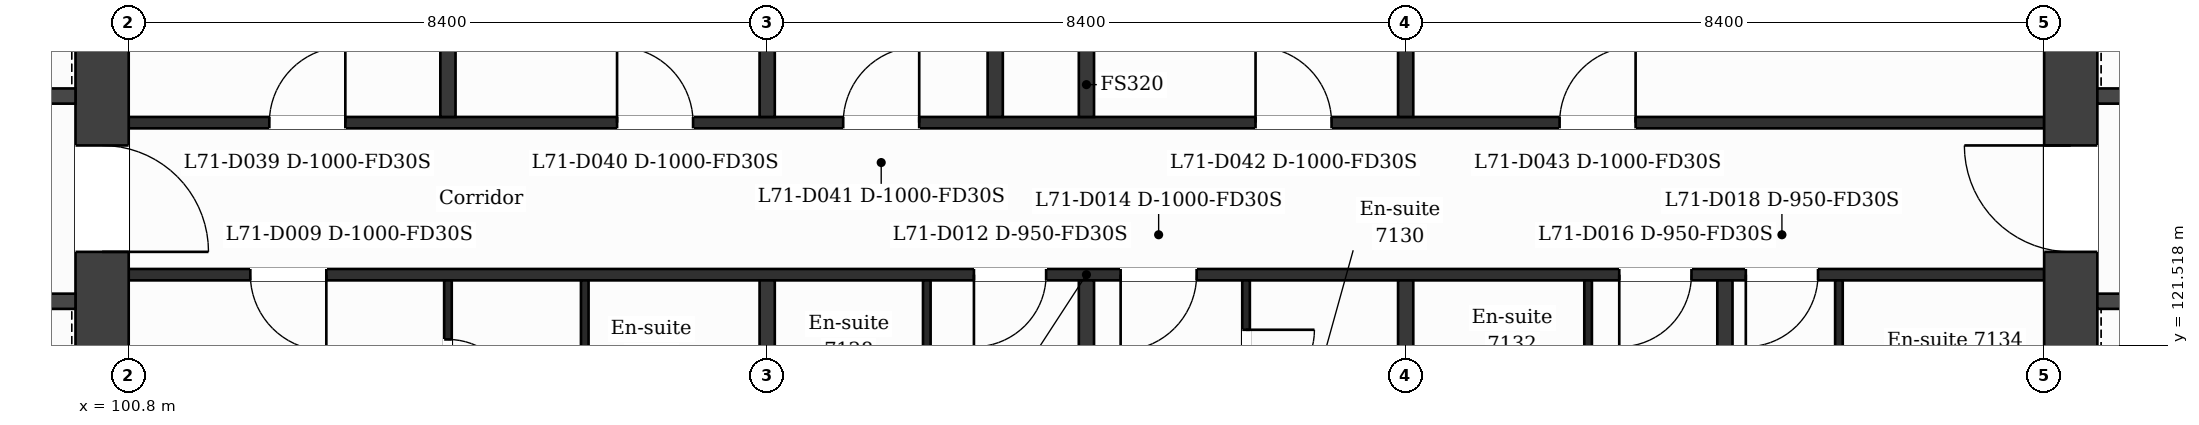
"""IFC4 building model, lengths in metres.
Left out: names, types, materials, properties, quantities, classifications, styles, units other than length and angle.
Written with IfcOpenShell. Run it as: python <this file> out.ifc"""

import sys

from ifc_helpers import new_model, si_unit, direction, frame, frame_2d, origin, place, context, subcontext, project, spatial, rectangle, extrude, element, fill, save


model = new_model("IFC4")
c1 = context("Model", 3, precision=1e-05, world=origin(), true_north=direction((0.0, 1.0)))
c2 = subcontext(c1, "Body", "Model", "MODEL_VIEW")
j1 = project(units=[si_unit("LENGTHUNIT", "METRE"), si_unit("PLANEANGLEUNIT", "RADIAN")], contexts=[c1])
p1 = place(None, origin())
s1 = spatial("IfcSite", under=j1, at=p1, CompositionType="ELEMENT")
p2 = place(p1, origin())
s2 = spatial("IfcBuilding", under=s1, at=p2, CompositionType="ELEMENT")
p3 = place(p2, frame((0.0, 0.0, 292.3)))
s3 = spatial("IfcBuildingStorey", under=s2, at=p3, CompositionType="ELEMENT", Elevation=292.3)
p4 = place(p3, frame((100.45, 132.05, 0.0), z_axis=(0.0, 0.0, 1.0), x_axis=(0.0, -1.0, 0.0)))
e1 = element("IfcWall", 1, at=p4, inside=s3, PredefinedType="SHEAR", context=c2, shape_type="SweptSolid", body=[
    extrude(rectangle(XDim=15.7, YDim=0.7, at=frame_2d((7.85, 0.0))), origin(), (0.0, 0.0, 1.0), 3.7),
])
p5 = place(p4, frame((7.9, 0.0, 0.0)))
e2 = element("IfcOpeningElement", 2, at=p5, cuts=e1, PredefinedType="OPENING", context=c2, shape_type="SweptSolid", body=[
    extrude(rectangle(XDim=1.4, YDim=2.1, at=frame_2d((0.7, 1.05))), frame((0.0, 0.36, 0.0), z_axis=(0.0, -1.0, 0.0), x_axis=(1.0, 0.0, 0.0)), (0.0, 0.0, 1.0), 0.72),
])
p6 = place(p3, frame((126.35, 116.35, 0.0), z_axis=(0.0, 0.0, 1.0), x_axis=(0.0, 1.0, 0.0)))
e3 = element("IfcWall", 3, at=p6, inside=s3, PredefinedType="SHEAR", context=c2, shape_type="SweptSolid", body=[
    extrude(rectangle(XDim=15.7, YDim=0.7, at=frame_2d((7.85, 0.0))), origin(), (0.0, 0.0, 1.0), 3.7),
])
p7 = place(p6, frame((6.4, 0.0, 0.0)))
e4 = element("IfcOpeningElement", 4, at=p7, cuts=e3, PredefinedType="OPENING", context=c2, shape_type="SweptSolid", body=[
    extrude(rectangle(XDim=1.4, YDim=2.1, at=frame_2d((0.7, 1.05))), frame((0.0, 0.36, 0.0), z_axis=(0.0, -1.0, 0.0), x_axis=(1.0, 0.0, 0.0)), (0.0, 0.0, 1.0), 0.72),
])
p8 = place(p3, frame((95.227, 122.1, 0.0), z_axis=(0.0, 0.0, 1.0), x_axis=(1.0, 0.0, 0.0)))
e5 = element("IfcWall", 5, at=p8, inside=s3, PredefinedType="PARTITIONING", context=c2, shape_type="SweptSolid", body=[
    extrude(rectangle(XDim=4.873, YDim=0.2, at=frame_2d((2.437, 0.0))), origin(), (0.0, 0.0, 1.0), 3.38),
])
p9 = place(p8, frame((0.732, 0.0, 0.0)))
e6 = element("IfcOpeningElement", 6, at=p9, cuts=e5, PredefinedType="OPENING", context=c2, shape_type="SweptSolid", body=[
    extrude(rectangle(XDim=1.1, YDim=2.1, at=frame_2d((0.55, 1.05))), frame((0.0, 0.11, 0.0), z_axis=(0.0, -1.0, 0.0), x_axis=(1.0, 0.0, 0.0)), (0.0, 0.0, 1.0), 0.22),
])
p10 = place(p8, frame((3.264, 0.0, 0.0)))
e7 = element("IfcOpeningElement", 7, at=p10, cuts=e5, PredefinedType="OPENING", context=c2, shape_type="SweptSolid", body=[
    extrude(rectangle(XDim=1.1, YDim=2.1, at=frame_2d((0.55, 1.05))), frame((0.0, 0.11, 0.0), z_axis=(0.0, -1.0, 0.0), x_axis=(1.0, 0.0, 0.0)), (0.0, 0.0, 1.0), 0.22),
])
p11 = place(p3, frame((126.7, 122.1, 0.0), z_axis=(0.0, 0.0, 1.0), x_axis=(1.0, 0.0, 0.0)))
e8 = element("IfcWall", 8, at=p11, inside=s3, PredefinedType="PARTITIONING", context=c2, shape_type="SweptSolid", body=[
    extrude(rectangle(XDim=4.873, YDim=0.2, at=frame_2d((2.437, 0.0))), origin(), (0.0, 0.0, 1.0), 3.38),
])
p12 = place(p11, frame((3.264, 0.0, 0.0)))
e9 = element("IfcOpeningElement", 9, at=p12, cuts=e8, PredefinedType="OPENING", context=c2, shape_type="SweptSolid", body=[
    extrude(rectangle(XDim=1.1, YDim=2.1, at=frame_2d((0.55, 1.05))), frame((0.0, 0.11, 0.0), z_axis=(0.0, -1.0, 0.0), x_axis=(1.0, 0.0, 0.0)), (0.0, 0.0, 1.0), 0.22),
])
p13 = place(p11, frame((0.827, 0.0, 0.0)))
e10 = element("IfcOpeningElement", 10, at=p13, cuts=e8, PredefinedType="OPENING", context=c2, shape_type="SweptSolid", body=[
    extrude(rectangle(XDim=1.1, YDim=2.1, at=frame_2d((0.55, 1.05))), frame((0.0, 0.11, 0.0), z_axis=(0.0, -1.0, 0.0), x_axis=(1.0, 0.0, 0.0)), (0.0, 0.0, 1.0), 0.22),
])
p14 = place(p3, frame((100.8, 122.45, 0.0), z_axis=(0.0, 0.0, 1.0), x_axis=(1.0, 0.0, 0.0)))
e11 = element("IfcWall", 11, at=p14, inside=s3, PredefinedType="PARTITIONING", context=c2, shape_type="SweptSolid", body=[
    extrude(rectangle(XDim=25.2, YDim=0.15, at=frame_2d((12.6, 0.0))), origin(), (0.0, 0.0, 1.0), 3.38),
])
p15 = place(p14, frame((1.6, 0.0, 0.0)))
e12 = element("IfcOpeningElement", 12, at=p15, cuts=e11, PredefinedType="OPENING", context=c2, shape_type="SweptSolid", body=[
    extrude(rectangle(XDim=1.0, YDim=2.1, at=frame_2d((0.5, 1.05))), frame((0.0, 0.085, 0.0), z_axis=(0.0, -1.0, 0.0), x_axis=(1.0, 0.0, 0.0)), (0.0, 0.0, 1.0), 0.17),
])
p16 = place(p14, frame((11.12, 0.0, 0.0)))
e13 = element("IfcOpeningElement", 13, at=p16, cuts=e11, PredefinedType="OPENING", context=c2, shape_type="SweptSolid", body=[
    extrude(rectangle(XDim=0.95, YDim=2.1, at=frame_2d((0.475, 1.05))), frame((0.0, 0.085, 0.0), z_axis=(0.0, -1.0, 0.0), x_axis=(1.0, 0.0, 0.0)), (0.0, 0.0, 1.0), 0.17),
])
p17 = place(p14, frame((13.05, 0.0, 0.0)))
e14 = element("IfcOpeningElement", 14, at=p17, cuts=e11, PredefinedType="OPENING", context=c2, shape_type="SweptSolid", body=[
    extrude(rectangle(XDim=1.0, YDim=2.1, at=frame_2d((0.5, 1.05))), frame((0.0, 0.085, 0.0), z_axis=(0.0, -1.0, 0.0), x_axis=(1.0, 0.0, 0.0)), (0.0, 0.0, 1.0), 0.17),
])
p18 = place(p14, frame((19.61, 0.0, 0.0)))
e15 = element("IfcOpeningElement", 15, at=p18, cuts=e11, PredefinedType="OPENING", context=c2, shape_type="SweptSolid", body=[
    extrude(rectangle(XDim=0.95, YDim=2.1, at=frame_2d((0.475, 1.05))), frame((0.0, 0.085, 0.0), z_axis=(0.0, -1.0, 0.0), x_axis=(1.0, 0.0, 0.0)), (0.0, 0.0, 1.0), 0.17),
])
p19 = place(p14, frame((21.275, 0.0, 0.0)))
e16 = element("IfcOpeningElement", 16, at=p19, cuts=e11, PredefinedType="OPENING", context=c2, shape_type="SweptSolid", body=[
    extrude(rectangle(XDim=0.95, YDim=2.1, at=frame_2d((0.475, 1.05))), frame((0.0, 0.085, 0.0), z_axis=(0.0, -1.0, 0.0), x_axis=(1.0, 0.0, 0.0)), (0.0, 0.0, 1.0), 0.17),
])
p20 = place(p3, frame((100.8, 124.45, 0.0), z_axis=(0.0, 0.0, 1.0), x_axis=(1.0, 0.0, 0.0)))
e17 = element("IfcWall", 17, at=p20, inside=s3, PredefinedType="PARTITIONING", context=c2, shape_type="SweptSolid", body=[
    extrude(rectangle(XDim=25.2, YDim=0.15, at=frame_2d((12.6, 0.0))), origin(), (0.0, 0.0, 1.0), 3.38),
])
p21 = place(p20, frame((1.85, 0.0, 0.0)))
e18 = element("IfcOpeningElement", 18, at=p21, cuts=e17, PredefinedType="OPENING", context=c2, shape_type="SweptSolid", body=[
    extrude(rectangle(XDim=1.0, YDim=2.1, at=frame_2d((0.5, 1.05))), frame((0.0, 0.085, 0.0), z_axis=(0.0, -1.0, 0.0), x_axis=(1.0, 0.0, 0.0)), (0.0, 0.0, 1.0), 0.17),
])
p22 = place(p20, frame((6.425, 0.0, 0.0)))
e19 = element("IfcOpeningElement", 19, at=p22, cuts=e17, PredefinedType="OPENING", context=c2, shape_type="SweptSolid", body=[
    extrude(rectangle(XDim=1.0, YDim=2.1, at=frame_2d((0.5, 1.05))), frame((0.0, 0.085, 0.0), z_axis=(0.0, -1.0, 0.0), x_axis=(1.0, 0.0, 0.0)), (0.0, 0.0, 1.0), 0.17),
])
p23 = place(p20, frame((9.4, 0.0, 0.0)))
e20 = element("IfcOpeningElement", 20, at=p23, cuts=e17, PredefinedType="OPENING", context=c2, shape_type="SweptSolid", body=[
    extrude(rectangle(XDim=1.0, YDim=2.1, at=frame_2d((0.5, 1.05))), frame((0.0, 0.085, 0.0), z_axis=(0.0, -1.0, 0.0), x_axis=(1.0, 0.0, 0.0)), (0.0, 0.0, 1.0), 0.17),
])
p24 = place(p20, frame((14.825, 0.0, 0.0)))
e21 = element("IfcOpeningElement", 21, at=p24, cuts=e17, PredefinedType="OPENING", context=c2, shape_type="SweptSolid", body=[
    extrude(rectangle(XDim=1.0, YDim=2.1, at=frame_2d((0.5, 1.05))), frame((0.0, 0.085, 0.0), z_axis=(0.0, -1.0, 0.0), x_axis=(1.0, 0.0, 0.0)), (0.0, 0.0, 1.0), 0.17),
])
p25 = place(p20, frame((18.825, 0.0, 0.0)))
e22 = element("IfcOpeningElement", 22, at=p25, cuts=e17, PredefinedType="OPENING", context=c2, shape_type="SweptSolid", body=[
    extrude(rectangle(XDim=1.0, YDim=2.1, at=frame_2d((0.5, 1.05))), frame((0.0, 0.085, 0.0), z_axis=(0.0, -1.0, 0.0), x_axis=(1.0, 0.0, 0.0)), (0.0, 0.0, 1.0), 0.17),
])
p26 = place(p3, frame((92.702, 124.8, 0.0), z_axis=(0.0, 0.0, 1.0), x_axis=(1.0, 0.0, 0.0)))
e23 = element("IfcWall", 23, at=p26, inside=s3, PredefinedType="PARTITIONING", context=c2, shape_type="SweptSolid", body=[
    extrude(rectangle(XDim=7.398, YDim=0.2, at=frame_2d((3.699, 0.0))), origin(), (0.0, 0.0, 1.0), 3.38),
])
p27 = place(p26, frame((5.48, 0.0, 0.0)))
e24 = element("IfcOpeningElement", 24, at=p27, cuts=e23, PredefinedType="OPENING", context=c2, shape_type="SweptSolid", body=[
    extrude(rectangle(XDim=1.1, YDim=2.1, at=frame_2d((0.55, 1.05))), frame((0.0, 0.11, 0.0), z_axis=(0.0, -1.0, 0.0), x_axis=(1.0, 0.0, 0.0)), (0.0, 0.0, 1.0), 0.22),
])
p28 = place(p3, frame((126.7, 124.8, 0.0), z_axis=(0.0, 0.0, 1.0), x_axis=(1.0, 0.0, 0.0)))
e25 = element("IfcWall", 25, at=p28, inside=s3, PredefinedType="PARTITIONING", context=c2, shape_type="SweptSolid", body=[
    extrude(rectangle(XDim=4.849, YDim=0.2, at=frame_2d((2.424, 0.0))), origin(), (0.0, 0.0, 1.0), 3.38),
])
p29 = place(p28, frame((0.818, 0.0, 0.0)))
e26 = element("IfcOpeningElement", 26, at=p29, cuts=e25, PredefinedType="OPENING", context=c2, shape_type="SweptSolid", body=[
    extrude(rectangle(XDim=1.1, YDim=2.1, at=frame_2d((0.55, 1.05))), frame((0.0, 0.11, 0.0), z_axis=(0.0, -1.0, 0.0), x_axis=(1.0, 0.0, 0.0)), (0.0, 0.0, 1.0), 0.22),
])
p30 = place(p3, frame((105.0, 117.79, 0.0), z_axis=(0.0, 0.0, 1.0), x_axis=(0.0, 1.0, 0.0)))
e27 = element("IfcWall", 27, at=p30, inside=s3, PredefinedType="PARTITIONING", context=c2, shape_type="SweptSolid", body=[
    extrude(rectangle(XDim=4.585, YDim=0.1, at=frame_2d((2.292, 0.0))), origin(), (0.0, 0.0, 1.0), 3.38),
])
p31 = place(p30, frame((2.908, 0.0, 0.0)))
e28 = element("IfcOpeningElement", 28, at=p31, cuts=e27, PredefinedType="OPENING", context=c2, shape_type="SweptSolid", body=[
    extrude(rectangle(XDim=0.9, YDim=2.1, at=frame_2d((0.45, 1.05))), frame((0.0, 0.06, 0.0), z_axis=(0.0, -1.0, 0.0), x_axis=(1.0, 0.0, 0.0)), (0.0, 0.0, 1.0), 0.12),
])
p32 = place(p3, frame((105.0, 124.525, 0.0), z_axis=(0.0, 0.0, 1.0), x_axis=(0.0, 1.0, 0.0)))
e29 = element("IfcWall", 29, at=p32, inside=s3, PredefinedType="PARTITIONING", context=c2, shape_type="SweptSolid", body=[
    extrude(rectangle(XDim=9.2, YDim=0.2, at=frame_2d((4.6, 0.0))), origin(), (0.0, 0.0, 1.0), 3.38),
])
p33 = place(p3, frame((106.8, 120.4, 0.0), z_axis=(0.0, 0.0, 1.0), x_axis=(0.0, 1.0, 0.0)))
e30 = element("IfcWall", 30, at=p33, inside=s3, PredefinedType="PARTITIONING", context=c2, shape_type="SweptSolid", body=[
    extrude(rectangle(XDim=1.975, YDim=0.1, at=frame_2d((0.988, 0.0))), origin(), (0.0, 0.0, 1.0), 3.38),
])
p34 = place(p3, frame((109.2, 117.79, 0.0), z_axis=(0.0, 0.0, 1.0), x_axis=(0.0, 1.0, 0.0)))
e31 = element("IfcWall", 31, at=p34, inside=s3, PredefinedType="PARTITIONING", context=c2, shape_type="SweptSolid", body=[
    extrude(rectangle(XDim=4.585, YDim=0.2, at=frame_2d((2.292, 0.0))), origin(), (0.0, 0.0, 1.0), 3.38),
])
p35 = place(p3, frame((109.2, 124.525, 0.0), z_axis=(0.0, 0.0, 1.0), x_axis=(0.0, 1.0, 0.0)))
e32 = element("IfcWall", 32, at=p35, inside=s3, PredefinedType="PARTITIONING", context=c2, shape_type="SweptSolid", body=[
    extrude(rectangle(XDim=9.2, YDim=0.2, at=frame_2d((4.6, 0.0))), origin(), (0.0, 0.0, 1.0), 3.38),
])
p36 = place(p3, frame((111.3, 120.4, 0.0), z_axis=(0.0, 0.0, 1.0), x_axis=(0.0, 1.0, 0.0)))
e33 = element("IfcWall", 33, at=p36, inside=s3, PredefinedType="PARTITIONING", context=c2, shape_type="SweptSolid", body=[
    extrude(rectangle(XDim=1.975, YDim=0.1, at=frame_2d((0.988, 0.0))), origin(), (0.0, 0.0, 1.0), 3.38),
])
p37 = place(p3, frame((112.2, 124.525, 0.0), z_axis=(0.0, 0.0, 1.0), x_axis=(0.0, 1.0, 0.0)))
e34 = element("IfcWall", 34, at=p37, inside=s3, PredefinedType="PARTITIONING", context=c2, shape_type="SweptSolid", body=[
    extrude(rectangle(XDim=5.825, YDim=0.2, at=frame_2d((2.913, 0.0))), origin(), (0.0, 0.0, 1.0), 3.38),
])
p38 = place(p3, frame((113.4, 117.79, 0.0), z_axis=(0.0, 0.0, 1.0), x_axis=(0.0, 1.0, 0.0)))
e35 = element("IfcWall", 35, at=p38, inside=s3, PredefinedType="PARTITIONING", context=c2, shape_type="SweptSolid", body=[
    extrude(rectangle(XDim=4.585, YDim=0.2, at=frame_2d((2.292, 0.0))), origin(), (0.0, 0.0, 1.0), 3.38),
])
p39 = place(p3, frame((113.4, 124.525, 0.0), z_axis=(0.0, 0.0, 1.0), x_axis=(0.0, 1.0, 0.0)))
e36 = element("IfcWall", 36, at=p39, inside=s3, PredefinedType="PARTITIONING", context=c2, shape_type="SweptSolid", body=[
    extrude(rectangle(XDim=9.2, YDim=0.2, at=frame_2d((4.6, 0.0))), origin(), (0.0, 0.0, 1.0), 3.38),
])
p40 = place(p3, frame((115.5, 120.4, 0.0), z_axis=(0.0, 0.0, 1.0), x_axis=(0.0, 1.0, 0.0)))
e37 = element("IfcWall", 37, at=p40, inside=s3, PredefinedType="PARTITIONING", context=c2, shape_type="SweptSolid", body=[
    extrude(rectangle(XDim=1.975, YDim=0.1, at=frame_2d((0.988, 0.0))), origin(), (0.0, 0.0, 1.0), 3.38),
])
p41 = place(p40, frame((0.425, 0.0, 0.0)))
e38 = element("IfcOpeningElement", 38, at=p41, cuts=e37, PredefinedType="OPENING", context=c2, shape_type="SweptSolid", body=[
    extrude(rectangle(XDim=0.9, YDim=2.1, at=frame_2d((0.45, 1.05))), frame((0.0, 0.06, 0.0), z_axis=(0.0, -1.0, 0.0), x_axis=(1.0, 0.0, 0.0)), (0.0, 0.0, 1.0), 0.12),
])
p42 = place(p3, frame((117.6, 117.79, 0.0), z_axis=(0.0, 0.0, 1.0), x_axis=(0.0, 1.0, 0.0)))
e39 = element("IfcWall", 39, at=p42, inside=s3, PredefinedType="PARTITIONING", context=c2, shape_type="SweptSolid", body=[
    extrude(rectangle(XDim=4.585, YDim=0.2, at=frame_2d((2.292, 0.0))), origin(), (0.0, 0.0, 1.0), 3.38),
])
p43 = place(p3, frame((117.6, 124.525, 0.0), z_axis=(0.0, 0.0, 1.0), x_axis=(0.0, 1.0, 0.0)))
e40 = element("IfcWall", 40, at=p43, inside=s3, PredefinedType="PARTITIONING", context=c2, shape_type="SweptSolid", body=[
    extrude(rectangle(XDim=9.2, YDim=0.2, at=frame_2d((4.6, 0.0))), origin(), (0.0, 0.0, 1.0), 3.38),
])
p44 = place(p3, frame((120.0, 120.4, 0.0), z_axis=(0.0, 0.0, 1.0), x_axis=(0.0, 1.0, 0.0)))
e41 = element("IfcWall", 41, at=p44, inside=s3, PredefinedType="PARTITIONING", context=c2, shape_type="SweptSolid", body=[
    extrude(rectangle(XDim=1.975, YDim=0.1, at=frame_2d((0.988, 0.0))), origin(), (0.0, 0.0, 1.0), 3.38),
])
p45 = place(p3, frame((121.8, 117.79, 0.0), z_axis=(0.0, 0.0, 1.0), x_axis=(0.0, 1.0, 0.0)))
e42 = element("IfcWall", 42, at=p45, inside=s3, PredefinedType="PARTITIONING", context=c2, shape_type="SweptSolid", body=[
    extrude(rectangle(XDim=4.585, YDim=0.2, at=frame_2d((2.292, 0.0))), origin(), (0.0, 0.0, 1.0), 3.38),
])
p46 = place(p3, frame((123.3, 120.1, 0.0), z_axis=(0.0, 0.0, 1.0), x_axis=(0.0, 1.0, 0.0)))
e43 = element("IfcWall", 43, at=p46, inside=s3, PredefinedType="PARTITIONING", context=c2, shape_type="SweptSolid", body=[
    extrude(rectangle(XDim=2.275, YDim=0.1, at=frame_2d((1.137, 0.0))), origin(), (0.0, 0.0, 1.0), 3.38),
])
p47 = place(p15, origin())
e44 = element("IfcDoor", 44, at=p47, inside=s3, OperationType="SINGLE_SWING_RIGHT", PredefinedType="DOOR", context=c2, shape_type="SweptSolid", body=[
    extrude(rectangle(XDim=1.0, YDim=2.1, at=frame_2d((0.5, 1.05))), frame((0.0, 0.025, 0.0), z_axis=(0.0, -1.0, 0.0), x_axis=(1.0, 0.0, 0.0)), (0.0, 0.0, 1.0), 0.05),
])
fill(e12, e44)
p48 = place(p31, origin())
e45 = element("IfcDoor", 45, at=p48, inside=s3, OperationType="SINGLE_SWING_LEFT", PredefinedType="DOOR", context=c2, shape_type="SweptSolid", body=[
    extrude(rectangle(XDim=0.9, YDim=2.1, at=frame_2d((0.45, 1.05))), frame((0.0, 0.025, 0.0), z_axis=(0.0, -1.0, 0.0), x_axis=(1.0, 0.0, 0.0)), (0.0, 0.0, 1.0), 0.05),
])
fill(e28, e45)
p49 = place(p16, origin())
e46 = element("IfcDoor", 46, at=p49, inside=s3, OperationType="SINGLE_SWING_LEFT", PredefinedType="DOOR", context=c2, shape_type="SweptSolid", body=[
    extrude(rectangle(XDim=0.95, YDim=2.1, at=frame_2d((0.475, 1.05))), frame((0.0, 0.025, 0.0), z_axis=(0.0, -1.0, 0.0), x_axis=(1.0, 0.0, 0.0)), (0.0, 0.0, 1.0), 0.05),
])
fill(e13, e46)
p50 = place(p17, origin())
e47 = element("IfcDoor", 47, at=p50, inside=s3, OperationType="SINGLE_SWING_LEFT", PredefinedType="DOOR", context=c2, shape_type="SweptSolid", body=[
    extrude(rectangle(XDim=1.0, YDim=2.1, at=frame_2d((0.5, 1.05))), frame((0.0, 0.025, 0.0), z_axis=(0.0, -1.0, 0.0), x_axis=(1.0, 0.0, 0.0)), (0.0, 0.0, 1.0), 0.05),
])
fill(e14, e47)
p51 = place(p41, origin())
e48 = element("IfcDoor", 48, at=p51, inside=s3, OperationType="SINGLE_SWING_RIGHT", PredefinedType="DOOR", context=c2, shape_type="SweptSolid", body=[
    extrude(rectangle(XDim=0.9, YDim=2.1, at=frame_2d((0.45, 1.05))), frame((0.0, 0.025, 0.0), z_axis=(0.0, -1.0, 0.0), x_axis=(1.0, 0.0, 0.0)), (0.0, 0.0, 1.0), 0.05),
])
fill(e38, e48)
p52 = place(p18, origin())
e49 = element("IfcDoor", 49, at=p52, inside=s3, OperationType="SINGLE_SWING_LEFT", PredefinedType="DOOR", context=c2, shape_type="SweptSolid", body=[
    extrude(rectangle(XDim=0.95, YDim=2.1, at=frame_2d((0.475, 1.05))), frame((0.0, 0.025, 0.0), z_axis=(0.0, -1.0, 0.0), x_axis=(1.0, 0.0, 0.0)), (0.0, 0.0, 1.0), 0.05),
])
fill(e15, e49)
p53 = place(p19, origin())
e50 = element("IfcDoor", 50, at=p53, inside=s3, OperationType="SINGLE_SWING_LEFT", PredefinedType="DOOR", context=c2, shape_type="SweptSolid", body=[
    extrude(rectangle(XDim=0.95, YDim=2.1, at=frame_2d((0.475, 1.05))), frame((0.0, 0.025, 0.0), z_axis=(0.0, -1.0, 0.0), x_axis=(1.0, 0.0, 0.0)), (0.0, 0.0, 1.0), 0.05),
])
fill(e16, e50)
p54 = place(p21, origin())
e51 = element("IfcDoor", 51, at=p54, inside=s3, OperationType="SINGLE_SWING_RIGHT", PredefinedType="DOOR", context=c2, shape_type="SweptSolid", body=[
    extrude(rectangle(XDim=1.0, YDim=2.1, at=frame_2d((0.5, 1.05))), frame((0.0, 0.025, 0.0), z_axis=(0.0, -1.0, 0.0), x_axis=(1.0, 0.0, 0.0)), (0.0, 0.0, 1.0), 0.05),
])
fill(e18, e51)
p55 = place(p22, origin())
e52 = element("IfcDoor", 52, at=p55, inside=s3, OperationType="SINGLE_SWING_LEFT", PredefinedType="DOOR", context=c2, shape_type="SweptSolid", body=[
    extrude(rectangle(XDim=1.0, YDim=2.1, at=frame_2d((0.5, 1.05))), frame((0.0, 0.025, 0.0), z_axis=(0.0, -1.0, 0.0), x_axis=(1.0, 0.0, 0.0)), (0.0, 0.0, 1.0), 0.05),
])
fill(e19, e52)
p56 = place(p23, origin())
e53 = element("IfcDoor", 53, at=p56, inside=s3, OperationType="SINGLE_SWING_RIGHT", PredefinedType="DOOR", context=c2, shape_type="SweptSolid", body=[
    extrude(rectangle(XDim=1.0, YDim=2.1, at=frame_2d((0.5, 1.05))), frame((0.0, 0.025, 0.0), z_axis=(0.0, -1.0, 0.0), x_axis=(1.0, 0.0, 0.0)), (0.0, 0.0, 1.0), 0.05),
])
fill(e20, e53)
p57 = place(p24, origin())
e54 = element("IfcDoor", 54, at=p57, inside=s3, OperationType="SINGLE_SWING_LEFT", PredefinedType="DOOR", context=c2, shape_type="SweptSolid", body=[
    extrude(rectangle(XDim=1.0, YDim=2.1, at=frame_2d((0.5, 1.05))), frame((0.0, 0.025, 0.0), z_axis=(0.0, -1.0, 0.0), x_axis=(1.0, 0.0, 0.0)), (0.0, 0.0, 1.0), 0.05),
])
fill(e21, e54)
p58 = place(p25, origin())
e55 = element("IfcDoor", 55, at=p58, inside=s3, OperationType="SINGLE_SWING_RIGHT", PredefinedType="DOOR", context=c2, shape_type="SweptSolid", body=[
    extrude(rectangle(XDim=1.0, YDim=2.1, at=frame_2d((0.5, 1.05))), frame((0.0, 0.025, 0.0), z_axis=(0.0, -1.0, 0.0), x_axis=(1.0, 0.0, 0.0)), (0.0, 0.0, 1.0), 0.05),
])
fill(e22, e55)
p59 = place(p5, origin())
e56 = element("IfcDoor", 56, at=p59, inside=s3, OperationType="SINGLE_SWING_RIGHT", PredefinedType="DOOR", context=c2, shape_type="SweptSolid", body=[
    extrude(rectangle(XDim=1.4, YDim=2.1, at=frame_2d((0.7, 1.05))), frame((0.0, 0.025, 0.0), z_axis=(0.0, -1.0, 0.0), x_axis=(1.0, 0.0, 0.0)), (0.0, 0.0, 1.0), 0.05),
])
fill(e2, e56)
p60 = place(p7, origin())
e57 = element("IfcDoor", 57, at=p60, inside=s3, OperationType="SINGLE_SWING_RIGHT", PredefinedType="DOOR", context=c2, shape_type="SweptSolid", body=[
    extrude(rectangle(XDim=1.4, YDim=2.1, at=frame_2d((0.7, 1.05))), frame((0.0, 0.025, 0.0), z_axis=(0.0, -1.0, 0.0), x_axis=(1.0, 0.0, 0.0)), (0.0, 0.0, 1.0), 0.05),
])
fill(e4, e57)
save(model, sys.argv[1])
